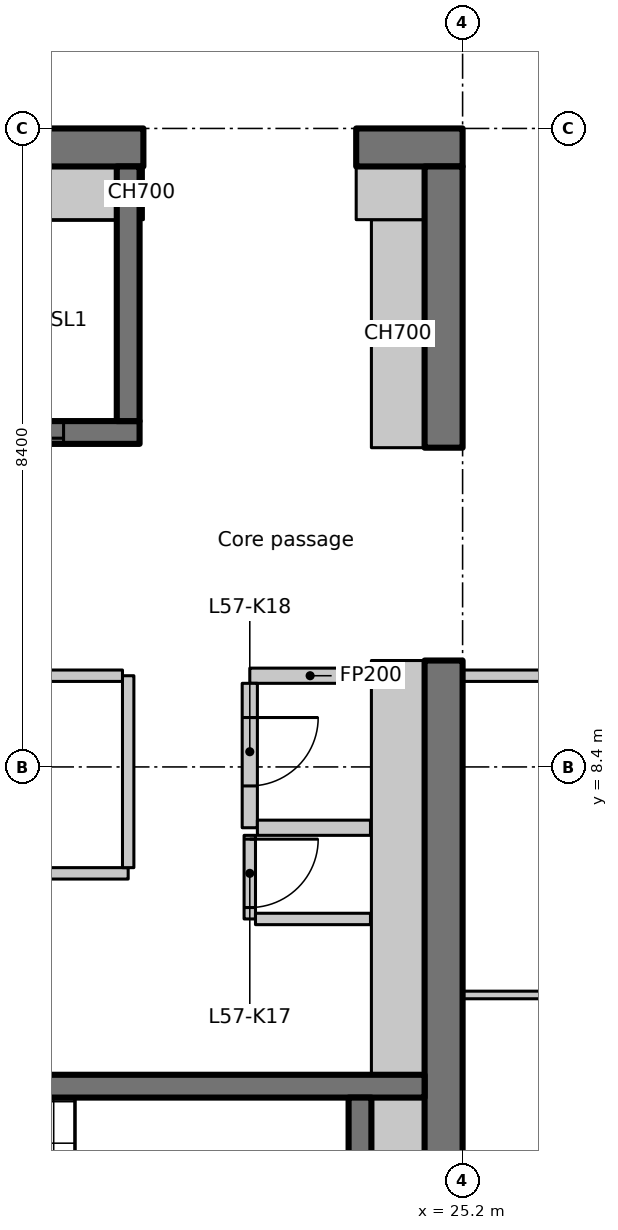
"""IFC4 building model, lengths in metres.
Left out: names, types, materials, properties, quantities, classifications, styles, units other than length and angle.
Written with IfcOpenShell. Run it as: python <this file> out.ifc"""

import sys

from ifc_helpers import new_model, si_unit, direction, frame, frame_2d, origin, place, context, subcontext, project, spatial, rectangle, extrude, element, fill, save


model = new_model("IFC4")
c1 = context("Model", 3, precision=1e-05, world=origin(), true_north=direction((0.0, 1.0)))
c2 = subcontext(c1, "Body", "Model", "MODEL_VIEW")
j1 = project(units=[si_unit("LENGTHUNIT", "METRE"), si_unit("PLANEANGLEUNIT", "RADIAN")], contexts=[c1])
p1 = place(None, origin())
s1 = spatial("IfcSite", under=j1, at=p1, CompositionType="ELEMENT")
p2 = place(p1, origin())
s2 = spatial("IfcBuilding", under=s1, at=p2, CompositionType="ELEMENT")
p3 = place(p2, frame((0.0, 0.0, 226.5)))
s3 = spatial("IfcBuildingStorey", under=s2, at=p3, CompositionType="ELEMENT", Elevation=226.5)
p4 = place(p3, frame((-1.1, 16.55, 0.0), z_axis=(0.0, 0.0, 1.0), x_axis=(1.0, 0.0, 0.0)))
e1 = element("IfcWall", 1, at=p4, inside=s3, PredefinedType="SHEAR", context=c2, shape_type="SweptSolid", body=[
    extrude(rectangle(XDim=22.1, YDim=0.5, at=frame_2d((11.05, 0.0))), origin(), (0.0, 0.0, 1.0), 3.35),
])
p5 = place(p4, frame((3.15, 0.0, 0.0)))
e2 = element("IfcOpeningElement", 2, at=p5, cuts=e1, PredefinedType="OPENING", context=c2, shape_type="SweptSolid", body=[
    extrude(rectangle(XDim=1.1, YDim=2.3, at=frame_2d((0.55, 1.15))), frame((0.0, 0.26, 0.0), z_axis=(0.0, -1.0, 0.0), x_axis=(1.0, 0.0, 0.0)), (0.0, 0.0, 1.0), 0.52),
])
p6 = place(p3, frame((23.8, 16.55, 0.0), z_axis=(0.0, 0.0, 1.0), x_axis=(1.0, 0.0, 0.0)))
e3 = element("IfcWall", 3, at=p6, inside=s3, PredefinedType="SHEAR", context=c2, shape_type="SweptSolid", body=[
    extrude(rectangle(XDim=1.4, YDim=0.5, at=frame_2d((0.7, 0.0))), origin(), (0.0, 0.0, 1.0), 3.35),
])
p7 = place(p3, frame((24.95, 0.5, 0.0), z_axis=(0.0, 0.0, 1.0), x_axis=(0.0, 1.0, 0.0)))
e4 = element("IfcWall", 4, at=p7, inside=s3, PredefinedType="SHEAR", context=c2, shape_type="SweptSolid", body=[
    extrude(rectangle(XDim=9.3, YDim=0.5, at=frame_2d((4.65, 0.0))), origin(), (0.0, 0.0, 1.0), 3.35),
])
p8 = place(p3, frame((24.95, 12.6, 0.0), z_axis=(0.0, 0.0, 1.0), x_axis=(0.0, 1.0, 0.0)))
e5 = element("IfcWall", 5, at=p8, inside=s3, PredefinedType="SHEAR", context=c2, shape_type="SweptSolid", body=[
    extrude(rectangle(XDim=3.7, YDim=0.5, at=frame_2d((1.85, 0.0))), origin(), (0.0, 0.0, 1.0), 3.35),
])
p9 = place(p3, frame((24.35, 12.6, 0.0), z_axis=(0.0, 0.0, 1.0), x_axis=(0.0, 1.0, 0.0)))
e6 = element("IfcWall", 6, at=p9, inside=s3, PredefinedType="PARTITIONING", context=c2, shape_type="SweptSolid", body=[
    extrude(rectangle(XDim=3.0, YDim=0.7, at=frame_2d((1.5, 0.0))), origin(), (0.0, 0.0, 1.0), 3.35),
])
p10 = place(p3, frame((23.8, 15.95, 0.0), z_axis=(0.0, 0.0, 1.0), x_axis=(1.0, 0.0, 0.0)))
e7 = element("IfcWall", 7, at=p10, inside=s3, PredefinedType="PARTITIONING", context=c2, shape_type="SweptSolid", body=[
    extrude(rectangle(XDim=0.9, YDim=0.7, at=frame_2d((0.45, 0.0))), origin(), (0.0, 0.0, 1.0), 3.35),
])
p11 = place(p3, frame((17.85, 12.8, 0.0), z_axis=(0.0, 0.0, 1.0), x_axis=(1.0, 0.0, 0.0)))
e8 = element("IfcWall", 8, at=p11, inside=s3, PredefinedType="SHEAR", context=c2, shape_type="SweptSolid", body=[
    extrude(rectangle(XDim=3.1, YDim=0.3, at=frame_2d((1.55, 0.0))), origin(), (0.0, 0.0, 1.0), 3.35),
])
p12 = place(p11, frame((1.0, 0.0, 0.0)))
e9 = element("IfcOpeningElement", 9, at=p12, cuts=e8, PredefinedType="OPENING", context=c2, shape_type="SweptSolid", body=[
    extrude(rectangle(XDim=1.1, YDim=2.3, at=frame_2d((0.55, 1.15))), frame((0.0, 0.16, 0.0), z_axis=(0.0, -1.0, 0.0), x_axis=(1.0, 0.0, 0.0)), (0.0, 0.0, 1.0), 0.32),
])
p13 = place(p3, frame((20.8, 12.95, 0.0), z_axis=(0.0, 0.0, 1.0), x_axis=(0.0, 1.0, 0.0)))
e10 = element("IfcWall", 10, at=p13, inside=s3, PredefinedType="SHEAR", context=c2, shape_type="SweptSolid", body=[
    extrude(rectangle(XDim=3.35, YDim=0.3, at=frame_2d((1.675, 0.0))), origin(), (0.0, 0.0, 1.0), 3.35),
])
p14 = place(p3, frame((15.8, 4.2, 0.0), z_axis=(0.0, 0.0, 1.0), x_axis=(1.0, 0.0, 0.0)))
e11 = element("IfcWall", 11, at=p14, inside=s3, PredefinedType="SHEAR", context=c2, shape_type="SweptSolid", body=[
    extrude(rectangle(XDim=8.9, YDim=0.3, at=frame_2d((4.45, 0.0))), origin(), (0.0, 0.0, 1.0), 3.35),
])
p15 = place(p14, frame((0.4, 0.0, 0.0)))
e12 = element("IfcOpeningElement", 12, at=p15, cuts=e11, PredefinedType="OPENING", context=c2, shape_type="SweptSolid", body=[
    extrude(rectangle(XDim=1.0, YDim=2.1, at=frame_2d((0.5, 1.05))), frame((0.0, 0.16, 0.0), z_axis=(0.0, -1.0, 0.0), x_axis=(1.0, 0.0, 0.0)), (0.0, 0.0, 1.0), 0.32),
])
p16 = place(p3, frame((23.85, 1.5, 0.0), z_axis=(0.0, 0.0, 1.0), x_axis=(0.0, 1.0, 0.0)))
e13 = element("IfcWall", 13, at=p16, inside=s3, PredefinedType="SHEAR", context=c2, shape_type="SweptSolid", body=[
    extrude(rectangle(XDim=2.55, YDim=0.3, at=frame_2d((1.275, 0.0))), origin(), (0.0, 0.0, 1.0), 3.35),
])
p17 = place(p3, frame((23.988, 9.6, 0.0), z_axis=(0.0, 0.0, 1.0), x_axis=(-1.0, 0.0, 0.0)))
e14 = element("IfcWall", 14, at=p17, inside=s3, PredefinedType="PARTITIONING", context=c2, shape_type="SweptSolid", body=[
    extrude(rectangle(XDim=1.588, YDim=0.2, at=frame_2d((0.794, 0.0))), origin(), (0.0, 0.0, 1.0), 3.35),
])
p18 = place(p3, frame((22.4, 9.5, 0.0), z_axis=(0.0, 0.0, 1.0), x_axis=(0.0, -1.0, 0.0)))
e15 = element("IfcWall", 15, at=p18, inside=s3, PredefinedType="PARTITIONING", context=c2, shape_type="SweptSolid", body=[
    extrude(rectangle(XDim=1.9, YDim=0.2, at=frame_2d((0.95, 0.0))), origin(), (0.0, 0.0, 1.0), 3.35),
])
p19 = place(p18, frame((0.45, 0.0, 0.0)))
e16 = element("IfcOpeningElement", 16, at=p19, cuts=e15, PredefinedType="OPENING", context=c2, shape_type="SweptSolid", body=[
    extrude(rectangle(XDim=0.9, YDim=2.1, at=frame_2d((0.45, 1.05))), frame((0.0, 0.11, 0.0), z_axis=(0.0, -1.0, 0.0), x_axis=(1.0, 0.0, 0.0)), (0.0, 0.0, 1.0), 0.22),
])
p20 = place(p3, frame((22.5, 7.6, 0.0), z_axis=(0.0, 0.0, 1.0), x_axis=(1.0, 0.0, 0.0)))
e17 = element("IfcWall", 17, at=p20, inside=s3, PredefinedType="PARTITIONING", context=c2, shape_type="SweptSolid", body=[
    extrude(rectangle(XDim=1.488, YDim=0.2, at=frame_2d((0.744, 0.0))), origin(), (0.0, 0.0, 1.0), 3.35),
])
p21 = place(p3, frame((12.5, 7.0, 0.0), z_axis=(0.0, 0.0, 1.0), x_axis=(1.0, 0.0, 0.0)))
e18 = element("IfcWall", 18, at=p21, inside=s3, PredefinedType="PARTITIONING", context=c2, shape_type="SweptSolid", body=[
    extrude(rectangle(XDim=8.3, YDim=0.15, at=frame_2d((4.15, 0.0))), origin(), (0.0, 0.0, 1.0), 3.35),
])
p22 = place(p3, frame((20.8, 7.075, 0.0), z_axis=(0.0, 0.0, 1.0), x_axis=(0.0, 1.0, 0.0)))
e19 = element("IfcWall", 19, at=p22, inside=s3, PredefinedType="PARTITIONING", context=c2, shape_type="SweptSolid", body=[
    extrude(rectangle(XDim=2.525, YDim=0.15, at=frame_2d((1.263, 0.0))), origin(), (0.0, 0.0, 1.0), 3.35),
])
p23 = place(p3, frame((20.725, 9.6, 0.0), z_axis=(0.0, 0.0, 1.0), x_axis=(-1.0, 0.0, 0.0)))
e20 = element("IfcWall", 20, at=p23, inside=s3, PredefinedType="PARTITIONING", context=c2, shape_type="SweptSolid", body=[
    extrude(rectangle(XDim=8.225, YDim=0.15, at=frame_2d((4.113, 0.0))), origin(), (0.0, 0.0, 1.0), 3.35),
])
p24 = place(p23, frame((3.675, 0.0, 0.0)))
e21 = element("IfcOpeningElement", 21, at=p24, cuts=e20, PredefinedType="OPENING", context=c2, shape_type="SweptSolid", body=[
    extrude(rectangle(XDim=0.9, YDim=2.1, at=frame_2d((0.45, 1.05))), frame((0.0, 0.085, 0.0), z_axis=(0.0, -1.0, 0.0), x_axis=(1.0, 0.0, 0.0)), (0.0, 0.0, 1.0), 0.17),
])
p25 = place(p3, frame((22.4, 7.5, 0.0), z_axis=(0.0, 0.0, 1.0), x_axis=(0.0, -1.0, 0.0)))
e22 = element("IfcWall", 22, at=p25, inside=s3, PredefinedType="PARTITIONING", context=c2, shape_type="SweptSolid", body=[
    extrude(rectangle(XDim=1.1, YDim=0.15, at=frame_2d((0.55, 0.0))), origin(), (0.0, 0.0, 1.0), 3.35),
])
p26 = place(p25, frame((0.05, 0.0, 0.0)))
e23 = element("IfcOpeningElement", 23, at=p26, cuts=e22, PredefinedType="OPENING", context=c2, shape_type="SweptSolid", body=[
    extrude(rectangle(XDim=0.9, YDim=2.1, at=frame_2d((0.45, 1.05))), frame((0.0, 0.085, 0.0), z_axis=(0.0, -1.0, 0.0), x_axis=(1.0, 0.0, 0.0)), (0.0, 0.0, 1.0), 0.17),
])
p27 = place(p3, frame((22.475, 6.4, 0.0), z_axis=(0.0, 0.0, 1.0), x_axis=(1.0, 0.0, 0.0)))
e24 = element("IfcWall", 24, at=p27, inside=s3, PredefinedType="PARTITIONING", context=c2, shape_type="SweptSolid", body=[
    extrude(rectangle(XDim=1.513, YDim=0.15, at=frame_2d((0.756, 0.0))), origin(), (0.0, 0.0, 1.0), 3.35),
])
p28 = place(p3, frame((18.15, 15.95, 0.0), z_axis=(0.0, 0.0, 1.0), x_axis=(1.0, 0.0, 0.0)))
e25 = element("IfcWall", 25, at=p28, inside=s3, PredefinedType="PARTITIONING", context=c2, shape_type="SweptSolid", body=[
    extrude(rectangle(XDim=2.5, YDim=0.7, at=frame_2d((1.25, 0.0))), origin(), (0.0, 0.0, 1.0), 3.35),
])
p29 = place(p3, frame((20.95, 15.95, 0.0), z_axis=(0.0, 0.0, 1.0), x_axis=(1.0, 0.0, 0.0)))
e26 = element("IfcWall", 26, at=p29, inside=s3, PredefinedType="PARTITIONING", context=c2, shape_type="SweptSolid", body=[
    extrude(rectangle(XDim=0.05, YDim=0.7, at=frame_2d((0.025, 0.0))), origin(), (0.0, 0.0, 1.0), 3.35),
])
p30 = place(p3, frame((24.35, 1.5, 0.0), z_axis=(0.0, 0.0, 1.0), x_axis=(0.0, 1.0, 0.0)))
e27 = element("IfcWall", 27, at=p30, inside=s3, PredefinedType="PARTITIONING", context=c2, shape_type="SweptSolid", body=[
    extrude(rectangle(XDim=2.55, YDim=0.7, at=frame_2d((1.275, 0.0))), origin(), (0.0, 0.0, 1.0), 3.35),
])
p31 = place(p3, frame((24.35, 4.35, 0.0), z_axis=(0.0, 0.0, 1.0), x_axis=(0.0, 1.0, 0.0)))
e28 = element("IfcWall", 28, at=p31, inside=s3, PredefinedType="PARTITIONING", context=c2, shape_type="SweptSolid", body=[
    extrude(rectangle(XDim=5.45, YDim=0.7, at=frame_2d((2.725, 0.0))), origin(), (0.0, 0.0, 1.0), 3.35),
])
p32 = place(p3, frame((29.4, 9.6, 0.0), z_axis=(0.0, 0.0, 1.0), x_axis=(-1.0, 0.0, 0.0)))
e29 = element("IfcWall", 29, at=p32, inside=s3, PredefinedType="PARTITIONING", context=c2, shape_type="SweptSolid", body=[
    extrude(rectangle(XDim=4.2, YDim=0.15, at=frame_2d((2.1, 0.0))), origin(), (0.0, 0.0, 1.0), 3.33),
])
p33 = place(p3, frame((25.2, 5.4, 0.0), z_axis=(0.0, 0.0, 1.0), x_axis=(1.0, 0.0, 0.0)))
e30 = element("IfcWall", 30, at=p33, inside=s3, PredefinedType="PARTITIONING", context=c2, shape_type="SweptSolid", body=[
    extrude(rectangle(XDim=4.2, YDim=0.1, at=frame_2d((2.1, 0.0))), origin(), (0.0, 0.0, 1.0), 3.33),
])
p34 = place(p12, origin())
e31 = element("IfcDoor", 31, at=p34, inside=s3, OperationType="SLIDING_TO_LEFT", PredefinedType="DOOR", context=c2, shape_type="SweptSolid", body=[
    extrude(rectangle(XDim=1.1, YDim=2.3, at=frame_2d((0.55, 1.15))), frame((0.0, 0.025, 0.0), z_axis=(0.0, -1.0, 0.0), x_axis=(1.0, 0.0, 0.0)), (0.0, 0.0, 1.0), 0.05),
])
fill(e9, e31)
p35 = place(p26, origin())
e32 = element("IfcDoor", 32, at=p35, inside=s3, OperationType="SINGLE_SWING_LEFT", PredefinedType="DOOR", context=c2, shape_type="SweptSolid", body=[
    extrude(rectangle(XDim=0.9, YDim=2.1, at=frame_2d((0.45, 1.05))), frame((0.0, 0.025, 0.0), z_axis=(0.0, -1.0, 0.0), x_axis=(1.0, 0.0, 0.0)), (0.0, 0.0, 1.0), 0.05),
])
fill(e23, e32)
p36 = place(p19, origin())
e33 = element("IfcDoor", 33, at=p36, inside=s3, OperationType="SINGLE_SWING_RIGHT", PredefinedType="DOOR", context=c2, shape_type="SweptSolid", body=[
    extrude(rectangle(XDim=0.9, YDim=2.1, at=frame_2d((0.45, 1.05))), frame((0.0, 0.025, 0.0), z_axis=(0.0, -1.0, 0.0), x_axis=(1.0, 0.0, 0.0)), (0.0, 0.0, 1.0), 0.05),
])
fill(e16, e33)
save(model, sys.argv[1])
